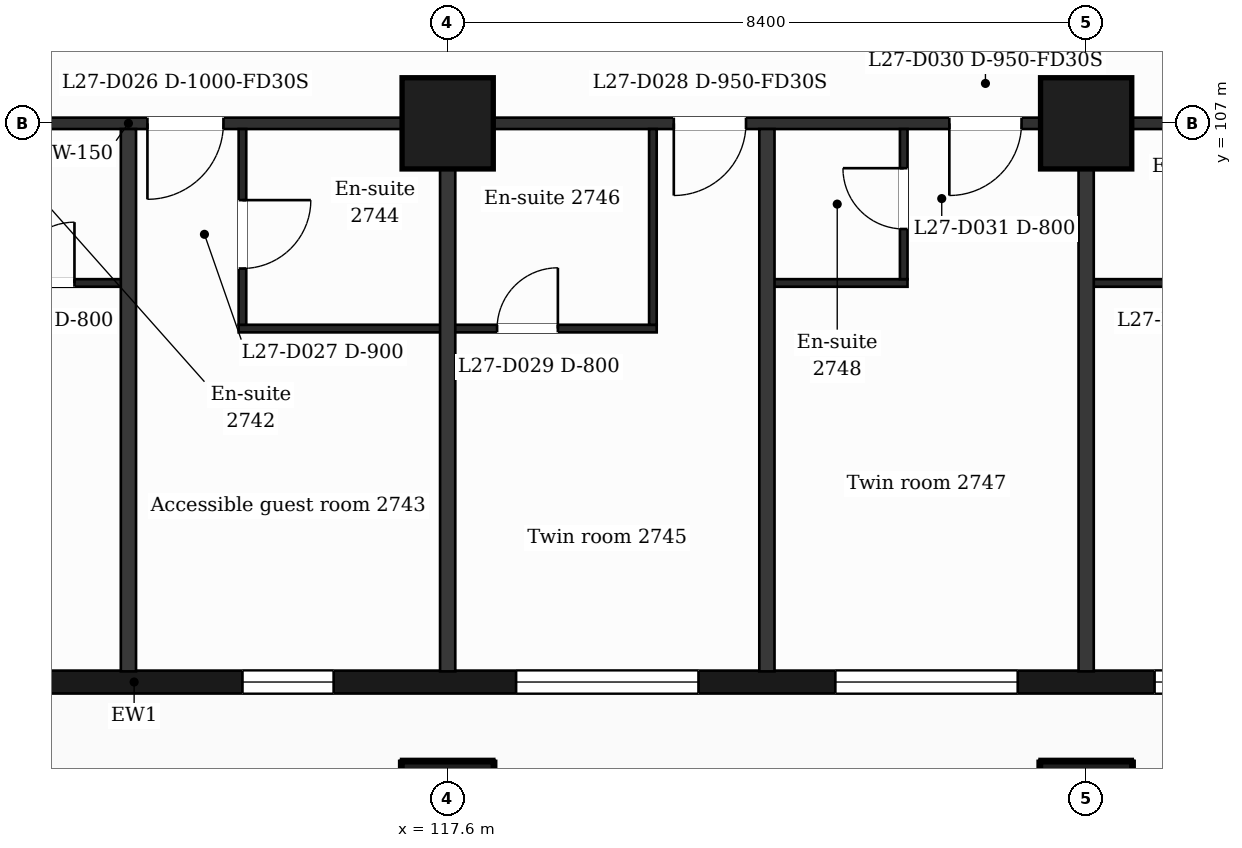
"""IFC4 building model, lengths in metres.
Left out: names, types, materials, properties, quantities, classifications, styles, units other than length and angle.
Written with IfcOpenShell. Run it as: python <this file> out.ifc"""

import sys

from ifc_helpers import new_model, si_unit, direction, frame, frame_2d, origin, origin_2d, place, context, subcontext, project, spatial, rectangle, extrude, element, fill, save


model = new_model("IFC4")
c1 = context("Model", 3, precision=1e-05, world=origin(), true_north=direction((0.0, 1.0)))
c2 = subcontext(c1, "Body", "Model", "MODEL_VIEW")
j1 = project(units=[si_unit("LENGTHUNIT", "METRE"), si_unit("PLANEANGLEUNIT", "RADIAN")], contexts=[c1])
p1 = place(None, origin())
s1 = spatial("IfcSite", under=j1, at=p1, CompositionType="ELEMENT")
p2 = place(p1, origin())
s2 = spatial("IfcBuilding", under=s1, at=p2, CompositionType="ELEMENT")
p3 = place(p2, frame((0.0, 0.0, 116.9)))
s3 = spatial("IfcBuildingStorey", under=s2, at=p3, CompositionType="ELEMENT", Elevation=116.9)
for number, where, z_axis, x_axis in (
    (1, (117.6, 98.0, 0.0), (0.0, 0.0, 1.0), (1.0, 0.0, 0.0)),
    (2, (126.0, 98.0, 0.0), (0.0, 0.0, 1.0), (1.0, 0.0, 0.0)),
    (3, (117.6, 107.0, 0.0), (0.0, 0.0, 1.0), (1.0, 0.0, 0.0)),
    (4, (126.0, 107.0, 0.0), (0.0, 0.0, 1.0), (1.0, 0.0, 0.0)),
):
    element("IfcColumn", number, at=place(p3, frame(where, z_axis=z_axis, x_axis=x_axis)), inside=s3, PredefinedType="COLUMN", context=c2, shape_type="SweptSolid", body=[
        extrude(rectangle(XDim=1.2, YDim=1.2, at=origin_2d()), origin(), (0.0, 0.0, 1.0), 3.7),
    ])
p4 = place(p3, frame((89.85, 99.65, 0.0), z_axis=(0.0, 0.0, 1.0), x_axis=(1.0, 0.0, 0.0)))
e5 = element("IfcWall", 5, at=p4, inside=s3, PredefinedType="SOLIDWALL", context=c2, shape_type="SweptSolid", body=[
    extrude(rectangle(XDim=47.25, YDim=0.3, at=frame_2d((23.625, 0.0))), origin(), (0.0, 0.0, 1.0), 3.38),
])
p5 = place(p4, frame((0.725, 0.0, 0.9)))
e6 = element("IfcOpeningElement", 6, at=p5, cuts=e5, PredefinedType="OPENING", context=c2, shape_type="SweptSolid", body=[
    extrude(rectangle(XDim=1.2, YDim=2.1, at=frame_2d((0.6, 1.05))), frame((0.0, 0.16, 0.0), z_axis=(0.0, -1.0, 0.0), x_axis=(1.0, 0.0, 0.0)), (0.0, 0.0, 1.0), 0.32),
])
p6 = place(p4, frame((3.45, 0.0, 0.9)))
e7 = element("IfcOpeningElement", 7, at=p6, cuts=e5, PredefinedType="OPENING", context=c2, shape_type="SweptSolid", body=[
    extrude(rectangle(XDim=2.4, YDim=2.1, at=frame_2d((1.2, 1.05))), frame((0.0, 0.16, 0.0), z_axis=(0.0, -1.0, 0.0), x_axis=(1.0, 0.0, 0.0)), (0.0, 0.0, 1.0), 0.32),
])
p7 = place(p4, frame((7.35, 0.0, 0.0)))
e8 = element("IfcOpeningElement", 8, at=p7, cuts=e5, PredefinedType="OPENING", context=c2, shape_type="SweptSolid", body=[
    extrude(rectangle(XDim=1.2, YDim=2.4, at=frame_2d((0.6, 1.2))), frame((0.0, 0.16, 0.0), z_axis=(0.0, -1.0, 0.0), x_axis=(1.0, 0.0, 0.0)), (0.0, 0.0, 1.0), 0.32),
])
p8 = place(p4, frame((9.15, 0.0, 0.9)))
e9 = element("IfcOpeningElement", 9, at=p8, cuts=e5, PredefinedType="OPENING", context=c2, shape_type="SweptSolid", body=[
    extrude(rectangle(XDim=1.2, YDim=2.1, at=frame_2d((0.6, 1.05))), frame((0.0, 0.16, 0.0), z_axis=(0.0, -1.0, 0.0), x_axis=(1.0, 0.0, 0.0)), (0.0, 0.0, 1.0), 0.32),
])
p9 = place(p4, frame((11.85, 0.0, 0.9)))
e10 = element("IfcOpeningElement", 10, at=p9, cuts=e5, PredefinedType="OPENING", context=c2, shape_type="SweptSolid", body=[
    extrude(rectangle(XDim=2.4, YDim=2.1, at=frame_2d((1.2, 1.05))), frame((0.0, 0.16, 0.0), z_axis=(0.0, -1.0, 0.0), x_axis=(1.0, 0.0, 0.0)), (0.0, 0.0, 1.0), 0.32),
])
p10 = place(p4, frame((16.05, 0.0, 0.9)))
e11 = element("IfcOpeningElement", 11, at=p10, cuts=e5, PredefinedType="OPENING", context=c2, shape_type="SweptSolid", body=[
    extrude(rectangle(XDim=2.4, YDim=2.1, at=frame_2d((1.2, 1.05))), frame((0.0, 0.16, 0.0), z_axis=(0.0, -1.0, 0.0), x_axis=(1.0, 0.0, 0.0)), (0.0, 0.0, 1.0), 0.32),
])
p11 = place(p4, frame((20.85, 0.0, 0.9)))
e12 = element("IfcOpeningElement", 12, at=p11, cuts=e5, PredefinedType="OPENING", context=c2, shape_type="SweptSolid", body=[
    extrude(rectangle(XDim=1.2, YDim=2.1, at=frame_2d((0.6, 1.05))), frame((0.0, 0.16, 0.0), z_axis=(0.0, -1.0, 0.0), x_axis=(1.0, 0.0, 0.0)), (0.0, 0.0, 1.0), 0.32),
])
p12 = place(p4, frame((25.05, 0.0, 0.9)))
e13 = element("IfcOpeningElement", 13, at=p12, cuts=e5, PredefinedType="OPENING", context=c2, shape_type="SweptSolid", body=[
    extrude(rectangle(XDim=1.2, YDim=2.1, at=frame_2d((0.6, 1.05))), frame((0.0, 0.16, 0.0), z_axis=(0.0, -1.0, 0.0), x_axis=(1.0, 0.0, 0.0)), (0.0, 0.0, 1.0), 0.32),
])
p13 = place(p4, frame((28.65, 0.0, 0.9)))
e14 = element("IfcOpeningElement", 14, at=p13, cuts=e5, PredefinedType="OPENING", context=c2, shape_type="SweptSolid", body=[
    extrude(rectangle(XDim=2.4, YDim=2.1, at=frame_2d((1.2, 1.05))), frame((0.0, 0.16, 0.0), z_axis=(0.0, -1.0, 0.0), x_axis=(1.0, 0.0, 0.0)), (0.0, 0.0, 1.0), 0.32),
])
p14 = place(p4, frame((32.85, 0.0, 0.9)))
e15 = element("IfcOpeningElement", 15, at=p14, cuts=e5, PredefinedType="OPENING", context=c2, shape_type="SweptSolid", body=[
    extrude(rectangle(XDim=2.4, YDim=2.1, at=frame_2d((1.2, 1.05))), frame((0.0, 0.16, 0.0), z_axis=(0.0, -1.0, 0.0), x_axis=(1.0, 0.0, 0.0)), (0.0, 0.0, 1.0), 0.32),
])
p15 = place(p4, frame((37.05, 0.0, 0.9)))
e16 = element("IfcOpeningElement", 16, at=p15, cuts=e5, PredefinedType="OPENING", context=c2, shape_type="SweptSolid", body=[
    extrude(rectangle(XDim=2.4, YDim=2.1, at=frame_2d((1.2, 1.05))), frame((0.0, 0.16, 0.0), z_axis=(0.0, -1.0, 0.0), x_axis=(1.0, 0.0, 0.0)), (0.0, 0.0, 1.0), 0.32),
])
p16 = place(p4, frame((41.25, 0.0, 0.9)))
e17 = element("IfcOpeningElement", 17, at=p16, cuts=e5, PredefinedType="OPENING", context=c2, shape_type="SweptSolid", body=[
    extrude(rectangle(XDim=2.4, YDim=2.1, at=frame_2d((1.2, 1.05))), frame((0.0, 0.16, 0.0), z_axis=(0.0, -1.0, 0.0), x_axis=(1.0, 0.0, 0.0)), (0.0, 0.0, 1.0), 0.32),
])
p17 = place(p4, frame((45.25, 0.0, 0.9)))
e18 = element("IfcOpeningElement", 18, at=p17, cuts=e5, PredefinedType="OPENING", context=c2, shape_type="SweptSolid", body=[
    extrude(rectangle(XDim=1.2, YDim=2.1, at=frame_2d((0.6, 1.05))), frame((0.0, 0.16, 0.0), z_axis=(0.0, -1.0, 0.0), x_axis=(1.0, 0.0, 0.0)), (0.0, 0.0, 1.0), 0.32),
])
p18 = place(p3, frame((114.85, 104.3, 0.0), z_axis=(0.0, 0.0, 1.0), x_axis=(1.0, 0.0, 0.0)))
e19 = element("IfcWall", 19, at=p18, inside=s3, PredefinedType="PARTITIONING", context=c2, shape_type="SweptSolid", body=[
    extrude(rectangle(XDim=5.5, YDim=0.1, at=frame_2d((2.75, 0.0))), origin(), (0.0, 0.0, 1.0), 3.38),
])
p19 = place(p18, frame((3.4, 0.0, 0.0)))
e20 = element("IfcOpeningElement", 20, at=p19, cuts=e19, PredefinedType="OPENING", context=c2, shape_type="SweptSolid", body=[
    extrude(rectangle(XDim=0.8, YDim=2.1, at=frame_2d((0.4, 1.05))), frame((0.0, 0.06, 0.0), z_axis=(0.0, -1.0, 0.0), x_axis=(1.0, 0.0, 0.0)), (0.0, 0.0, 1.0), 0.12),
])
p20 = place(p3, frame((111.25, 104.9, 0.0), z_axis=(0.0, 0.0, 1.0), x_axis=(1.0, 0.0, 0.0)))
e21 = element("IfcWall", 21, at=p20, inside=s3, PredefinedType="PARTITIONING", context=c2, shape_type="SweptSolid", body=[
    extrude(rectangle(XDim=2.15, YDim=0.1, at=frame_2d((1.075, 0.0))), origin(), (0.0, 0.0, 1.0), 3.38),
])
p21 = place(p20, frame((0.64, 0.0, 0.0)))
e22 = element("IfcOpeningElement", 22, at=p21, cuts=e21, PredefinedType="OPENING", context=c2, shape_type="SweptSolid", body=[
    extrude(rectangle(XDim=0.8, YDim=2.1, at=frame_2d((0.4, 1.05))), frame((0.0, 0.06, 0.0), z_axis=(0.0, -1.0, 0.0), x_axis=(1.0, 0.0, 0.0)), (0.0, 0.0, 1.0), 0.12),
])
p22 = place(p3, frame((121.8, 104.9, 0.0), z_axis=(0.0, 0.0, 1.0), x_axis=(1.0, 0.0, 0.0)))
e23 = element("IfcWall", 23, at=p22, inside=s3, PredefinedType="PARTITIONING", context=c2, shape_type="SweptSolid", body=[
    extrude(rectangle(XDim=1.85, YDim=0.1, at=frame_2d((0.925, 0.0))), origin(), (0.0, 0.0, 1.0), 3.38),
])
p23 = place(p3, frame((126.0, 104.9, 0.0), z_axis=(0.0, 0.0, 1.0), x_axis=(1.0, 0.0, 0.0)))
e24 = element("IfcWall", 24, at=p23, inside=s3, PredefinedType="PARTITIONING", context=c2, shape_type="SweptSolid", body=[
    extrude(rectangle(XDim=2.75, YDim=0.1, at=frame_2d((1.375, 0.0))), origin(), (0.0, 0.0, 1.0), 3.38),
])
p24 = place(p23, frame((1.07, 0.0, 0.0)))
e25 = element("IfcOpeningElement", 25, at=p24, cuts=e24, PredefinedType="OPENING", context=c2, shape_type="SweptSolid", body=[
    extrude(rectangle(XDim=0.8, YDim=2.1, at=frame_2d((0.4, 1.05))), frame((0.0, 0.06, 0.0), z_axis=(0.0, -1.0, 0.0), x_axis=(1.0, 0.0, 0.0)), (0.0, 0.0, 1.0), 0.12),
])
p25 = place(p3, frame((87.018, 107.0, 0.0), z_axis=(0.0, 0.0, 1.0), x_axis=(1.0, 0.0, 0.0)))
e26 = element("IfcWall", 26, at=p25, inside=s3, PredefinedType="PARTITIONING", context=c2, shape_type="SweptSolid", body=[
    extrude(rectangle(XDim=52.765, YDim=0.15, at=frame_2d((26.382, 0.0))), origin(), (0.0, 0.0, 1.0), 3.38),
])
p26 = place(p25, frame((1.276, 0.0, 0.0)))
e27 = element("IfcOpeningElement", 27, at=p26, cuts=e26, PredefinedType="OPENING", context=c2, shape_type="SweptSolid", body=[
    extrude(rectangle(XDim=0.95, YDim=2.1, at=frame_2d((0.475, 1.05))), frame((0.0, 0.085, 0.0), z_axis=(0.0, -1.0, 0.0), x_axis=(1.0, 0.0, 0.0)), (0.0, 0.0, 1.0), 0.17),
])
p27 = place(p25, frame((6.192, 0.0, 0.0)))
e28 = element("IfcOpeningElement", 28, at=p27, cuts=e26, PredefinedType="OPENING", context=c2, shape_type="SweptSolid", body=[
    extrude(rectangle(XDim=0.95, YDim=2.1, at=frame_2d((0.475, 1.05))), frame((0.0, 0.085, 0.0), z_axis=(0.0, -1.0, 0.0), x_axis=(1.0, 0.0, 0.0)), (0.0, 0.0, 1.0), 0.17),
])
p28 = place(p25, frame((11.982, 0.0, 0.0)))
e29 = element("IfcOpeningElement", 29, at=p28, cuts=e26, PredefinedType="OPENING", context=c2, shape_type="SweptSolid", body=[
    extrude(rectangle(XDim=1.0, YDim=2.1, at=frame_2d((0.5, 1.05))), frame((0.0, 0.085, 0.0), z_axis=(0.0, -1.0, 0.0), x_axis=(1.0, 0.0, 0.0)), (0.0, 0.0, 1.0), 0.17),
])
p29 = place(p25, frame((14.582, 0.0, 0.0)))
e30 = element("IfcOpeningElement", 30, at=p29, cuts=e26, PredefinedType="OPENING", context=c2, shape_type="SweptSolid", body=[
    extrude(rectangle(XDim=0.95, YDim=2.1, at=frame_2d((0.475, 1.05))), frame((0.0, 0.085, 0.0), z_axis=(0.0, -1.0, 0.0), x_axis=(1.0, 0.0, 0.0)), (0.0, 0.0, 1.0), 0.17),
])
p30 = place(p25, frame((18.257, 0.0, 0.0)))
e31 = element("IfcOpeningElement", 31, at=p30, cuts=e26, PredefinedType="OPENING", context=c2, shape_type="SweptSolid", body=[
    extrude(rectangle(XDim=0.95, YDim=2.1, at=frame_2d((0.475, 1.05))), frame((0.0, 0.085, 0.0), z_axis=(0.0, -1.0, 0.0), x_axis=(1.0, 0.0, 0.0)), (0.0, 0.0, 1.0), 0.17),
])
p31 = place(p25, frame((22.992, 0.0, 0.0)))
e32 = element("IfcOpeningElement", 32, at=p31, cuts=e26, PredefinedType="OPENING", context=c2, shape_type="SweptSolid", body=[
    extrude(rectangle(XDim=0.95, YDim=2.1, at=frame_2d((0.475, 1.05))), frame((0.0, 0.085, 0.0), z_axis=(0.0, -1.0, 0.0), x_axis=(1.0, 0.0, 0.0)), (0.0, 0.0, 1.0), 0.17),
])
p32 = place(p25, frame((26.632, 0.0, 0.0)))
e33 = element("IfcOpeningElement", 33, at=p32, cuts=e26, PredefinedType="OPENING", context=c2, shape_type="SweptSolid", body=[
    extrude(rectangle(XDim=1.0, YDim=2.1, at=frame_2d((0.5, 1.05))), frame((0.0, 0.085, 0.0), z_axis=(0.0, -1.0, 0.0), x_axis=(1.0, 0.0, 0.0)), (0.0, 0.0, 1.0), 0.17),
])
p33 = place(p25, frame((33.557, 0.0, 0.0)))
e34 = element("IfcOpeningElement", 34, at=p33, cuts=e26, PredefinedType="OPENING", context=c2, shape_type="SweptSolid", body=[
    extrude(rectangle(XDim=0.95, YDim=2.1, at=frame_2d((0.475, 1.05))), frame((0.0, 0.085, 0.0), z_axis=(0.0, -1.0, 0.0), x_axis=(1.0, 0.0, 0.0)), (0.0, 0.0, 1.0), 0.17),
])
p34 = place(p25, frame((37.182, 0.0, 0.0)))
e35 = element("IfcOpeningElement", 35, at=p34, cuts=e26, PredefinedType="OPENING", context=c2, shape_type="SweptSolid", body=[
    extrude(rectangle(XDim=0.95, YDim=2.1, at=frame_2d((0.475, 1.05))), frame((0.0, 0.085, 0.0), z_axis=(0.0, -1.0, 0.0), x_axis=(1.0, 0.0, 0.0)), (0.0, 0.0, 1.0), 0.17),
])
p35 = place(p25, frame((41.957, 0.0, 0.0)))
e36 = element("IfcOpeningElement", 36, at=p35, cuts=e26, PredefinedType="OPENING", context=c2, shape_type="SweptSolid", body=[
    extrude(rectangle(XDim=0.95, YDim=2.1, at=frame_2d((0.475, 1.05))), frame((0.0, 0.085, 0.0), z_axis=(0.0, -1.0, 0.0), x_axis=(1.0, 0.0, 0.0)), (0.0, 0.0, 1.0), 0.17),
])
p36 = place(p25, frame((45.622, 0.0, 0.0)))
e37 = element("IfcOpeningElement", 37, at=p36, cuts=e26, PredefinedType="OPENING", context=c2, shape_type="SweptSolid", body=[
    extrude(rectangle(XDim=0.95, YDim=2.1, at=frame_2d((0.475, 1.05))), frame((0.0, 0.085, 0.0), z_axis=(0.0, -1.0, 0.0), x_axis=(1.0, 0.0, 0.0)), (0.0, 0.0, 1.0), 0.17),
])
p37 = place(p25, frame((48.56, 0.0, 0.0)))
e38 = element("IfcOpeningElement", 38, at=p37, cuts=e26, PredefinedType="OPENING", context=c2, shape_type="SweptSolid", body=[
    extrude(rectangle(XDim=0.95, YDim=2.1, at=frame_2d((0.475, 1.05))), frame((0.0, 0.085, 0.0), z_axis=(0.0, -1.0, 0.0), x_axis=(1.0, 0.0, 0.0)), (0.0, 0.0, 1.0), 0.17),
])
p38 = place(p3, frame((113.4, 99.79, 0.0), z_axis=(0.0, 0.0, 1.0), x_axis=(0.0, 1.0, 0.0)))
e39 = element("IfcWall", 39, at=p38, inside=s3, PredefinedType="PARTITIONING", context=c2, shape_type="SweptSolid", body=[
    extrude(rectangle(XDim=7.135, YDim=0.2, at=frame_2d((3.567, 0.0))), origin(), (0.0, 0.0, 1.0), 3.38),
])
p39 = place(p3, frame((114.9, 104.35, 0.0), z_axis=(0.0, 0.0, 1.0), x_axis=(0.0, 1.0, 0.0)))
e40 = element("IfcWall", 40, at=p39, inside=s3, PredefinedType="PARTITIONING", context=c2, shape_type="SweptSolid", body=[
    extrude(rectangle(XDim=2.575, YDim=0.1, at=frame_2d((1.288, 0.0))), origin(), (0.0, 0.0, 1.0), 3.38),
])
p40 = place(p39, frame((0.74, 0.0, 0.0)))
e41 = element("IfcOpeningElement", 41, at=p40, cuts=e40, PredefinedType="OPENING", context=c2, shape_type="SweptSolid", body=[
    extrude(rectangle(XDim=0.9, YDim=2.1, at=frame_2d((0.45, 1.05))), frame((0.0, 0.06, 0.0), z_axis=(0.0, -1.0, 0.0), x_axis=(1.0, 0.0, 0.0)), (0.0, 0.0, 1.0), 0.12),
])
p41 = place(p3, frame((117.6, 99.79, 0.0), z_axis=(0.0, 0.0, 1.0), x_axis=(0.0, 1.0, 0.0)))
e42 = element("IfcWall", 42, at=p41, inside=s3, PredefinedType="PARTITIONING", context=c2, shape_type="SweptSolid", body=[
    extrude(rectangle(XDim=7.135, YDim=0.2, at=frame_2d((3.567, 0.0))), origin(), (0.0, 0.0, 1.0), 3.38),
])
p42 = place(p3, frame((120.3, 104.35, 0.0), z_axis=(0.0, 0.0, 1.0), x_axis=(0.0, 1.0, 0.0)))
e43 = element("IfcWall", 43, at=p42, inside=s3, PredefinedType="PARTITIONING", context=c2, shape_type="SweptSolid", body=[
    extrude(rectangle(XDim=2.575, YDim=0.1, at=frame_2d((1.288, 0.0))), origin(), (0.0, 0.0, 1.0), 3.38),
])
p43 = place(p3, frame((121.8, 99.79, 0.0), z_axis=(0.0, 0.0, 1.0), x_axis=(0.0, 1.0, 0.0)))
e44 = element("IfcWall", 44, at=p43, inside=s3, PredefinedType="PARTITIONING", context=c2, shape_type="SweptSolid", body=[
    extrude(rectangle(XDim=7.135, YDim=0.2, at=frame_2d((3.567, 0.0))), origin(), (0.0, 0.0, 1.0), 3.38),
])
p44 = place(p3, frame((123.6, 104.95, 0.0), z_axis=(0.0, 0.0, 1.0), x_axis=(0.0, 1.0, 0.0)))
e45 = element("IfcWall", 45, at=p44, inside=s3, PredefinedType="PARTITIONING", context=c2, shape_type="SweptSolid", body=[
    extrude(rectangle(XDim=1.975, YDim=0.1, at=frame_2d((0.988, 0.0))), origin(), (0.0, 0.0, 1.0), 3.38),
])
p45 = place(p44, frame((0.66, 0.0, 0.0)))
e46 = element("IfcOpeningElement", 46, at=p45, cuts=e45, PredefinedType="OPENING", context=c2, shape_type="SweptSolid", body=[
    extrude(rectangle(XDim=0.8, YDim=2.1, at=frame_2d((0.4, 1.05))), frame((0.0, 0.06, 0.0), z_axis=(0.0, -1.0, 0.0), x_axis=(1.0, 0.0, 0.0)), (0.0, 0.0, 1.0), 0.12),
])
p46 = place(p3, frame((126.0, 99.79, 0.0), z_axis=(0.0, 0.0, 1.0), x_axis=(0.0, 1.0, 0.0)))
e47 = element("IfcWall", 47, at=p46, inside=s3, PredefinedType="PARTITIONING", context=c2, shape_type="SweptSolid", body=[
    extrude(rectangle(XDim=7.135, YDim=0.2, at=frame_2d((3.567, 0.0))), origin(), (0.0, 0.0, 1.0), 3.38),
])
p47 = place(p12, origin())
e48 = element("IfcWindow", 48, at=p47, inside=s3, PartitioningType="SINGLE_PANEL", PredefinedType="WINDOW", context=c2, shape_type="SweptSolid", body=[
    extrude(rectangle(XDim=1.2, YDim=2.1, at=frame_2d((0.6, 1.05))), frame((0.0, 0.03, 0.0), z_axis=(0.0, -1.0, 0.0), x_axis=(1.0, 0.0, 0.0)), (0.0, 0.0, 1.0), 0.06),
])
fill(e13, e48)
p48 = place(p13, origin())
e49 = element("IfcWindow", 49, at=p48, inside=s3, PartitioningType="SINGLE_PANEL", PredefinedType="WINDOW", context=c2, shape_type="SweptSolid", body=[
    extrude(rectangle(XDim=2.4, YDim=2.1, at=frame_2d((1.2, 1.05))), frame((0.0, 0.03, 0.0), z_axis=(0.0, -1.0, 0.0), x_axis=(1.0, 0.0, 0.0)), (0.0, 0.0, 1.0), 0.06),
])
fill(e14, e49)
p49 = place(p14, origin())
e50 = element("IfcWindow", 50, at=p49, inside=s3, PartitioningType="SINGLE_PANEL", PredefinedType="WINDOW", context=c2, shape_type="SweptSolid", body=[
    extrude(rectangle(XDim=2.4, YDim=2.1, at=frame_2d((1.2, 1.05))), frame((0.0, 0.03, 0.0), z_axis=(0.0, -1.0, 0.0), x_axis=(1.0, 0.0, 0.0)), (0.0, 0.0, 1.0), 0.06),
])
fill(e15, e50)
p50 = place(p15, origin())
e51 = element("IfcWindow", 51, at=p50, inside=s3, PartitioningType="SINGLE_PANEL", PredefinedType="WINDOW", context=c2, shape_type="SweptSolid", body=[
    extrude(rectangle(XDim=2.4, YDim=2.1, at=frame_2d((1.2, 1.05))), frame((0.0, 0.03, 0.0), z_axis=(0.0, -1.0, 0.0), x_axis=(1.0, 0.0, 0.0)), (0.0, 0.0, 1.0), 0.06),
])
fill(e16, e51)
p51 = place(p21, origin())
e52 = element("IfcDoor", 52, at=p51, inside=s3, OperationType="SINGLE_SWING_RIGHT", PredefinedType="DOOR", context=c2, shape_type="SweptSolid", body=[
    extrude(rectangle(XDim=0.8, YDim=2.1, at=frame_2d((0.4, 1.05))), frame((0.0, 0.025, 0.0), z_axis=(0.0, -1.0, 0.0), x_axis=(1.0, 0.0, 0.0)), (0.0, 0.0, 1.0), 0.05),
])
fill(e22, e52)
p52 = place(p32, origin())
e53 = element("IfcDoor", 53, at=p52, inside=s3, OperationType="SINGLE_SWING_LEFT", PredefinedType="DOOR", context=c2, shape_type="SweptSolid", body=[
    extrude(rectangle(XDim=1.0, YDim=2.1, at=frame_2d((0.5, 1.05))), frame((0.0, 0.025, 0.0), z_axis=(0.0, -1.0, 0.0), x_axis=(1.0, 0.0, 0.0)), (0.0, 0.0, 1.0), 0.05),
])
fill(e33, e53)
p53 = place(p40, origin())
e54 = element("IfcDoor", 54, at=p53, inside=s3, OperationType="SINGLE_SWING_RIGHT", PredefinedType="DOOR", context=c2, shape_type="SweptSolid", body=[
    extrude(rectangle(XDim=0.9, YDim=2.1, at=frame_2d((0.45, 1.05))), frame((0.0, 0.025, 0.0), z_axis=(0.0, -1.0, 0.0), x_axis=(1.0, 0.0, 0.0)), (0.0, 0.0, 1.0), 0.05),
])
fill(e41, e54)
p54 = place(p33, origin())
e55 = element("IfcDoor", 55, at=p54, inside=s3, OperationType="SINGLE_SWING_LEFT", PredefinedType="DOOR", context=c2, shape_type="SweptSolid", body=[
    extrude(rectangle(XDim=0.95, YDim=2.1, at=frame_2d((0.475, 1.05))), frame((0.0, 0.025, 0.0), z_axis=(0.0, -1.0, 0.0), x_axis=(1.0, 0.0, 0.0)), (0.0, 0.0, 1.0), 0.05),
])
fill(e34, e55)
p55 = place(p19, origin())
e56 = element("IfcDoor", 56, at=p55, inside=s3, OperationType="SINGLE_SWING_RIGHT", PredefinedType="DOOR", context=c2, shape_type="SweptSolid", body=[
    extrude(rectangle(XDim=0.8, YDim=2.1, at=frame_2d((0.4, 1.05))), frame((0.0, 0.025, 0.0), z_axis=(0.0, -1.0, 0.0), x_axis=(1.0, 0.0, 0.0)), (0.0, 0.0, 1.0), 0.05),
])
fill(e20, e56)
p56 = place(p34, origin())
e57 = element("IfcDoor", 57, at=p56, inside=s3, OperationType="SINGLE_SWING_LEFT", PredefinedType="DOOR", context=c2, shape_type="SweptSolid", body=[
    extrude(rectangle(XDim=0.95, YDim=2.1, at=frame_2d((0.475, 1.05))), frame((0.0, 0.025, 0.0), z_axis=(0.0, -1.0, 0.0), x_axis=(1.0, 0.0, 0.0)), (0.0, 0.0, 1.0), 0.05),
])
fill(e35, e57)
p57 = place(p45, origin())
e58 = element("IfcDoor", 58, at=p57, inside=s3, OperationType="SINGLE_SWING_RIGHT", PredefinedType="DOOR", context=c2, shape_type="SweptSolid", body=[
    extrude(rectangle(XDim=0.8, YDim=2.1, at=frame_2d((0.4, 1.05))), frame((0.0, 0.025, 0.0), z_axis=(0.0, -1.0, 0.0), x_axis=(1.0, 0.0, 0.0)), (0.0, 0.0, 1.0), 0.05),
])
fill(e46, e58)
save(model, sys.argv[1])
